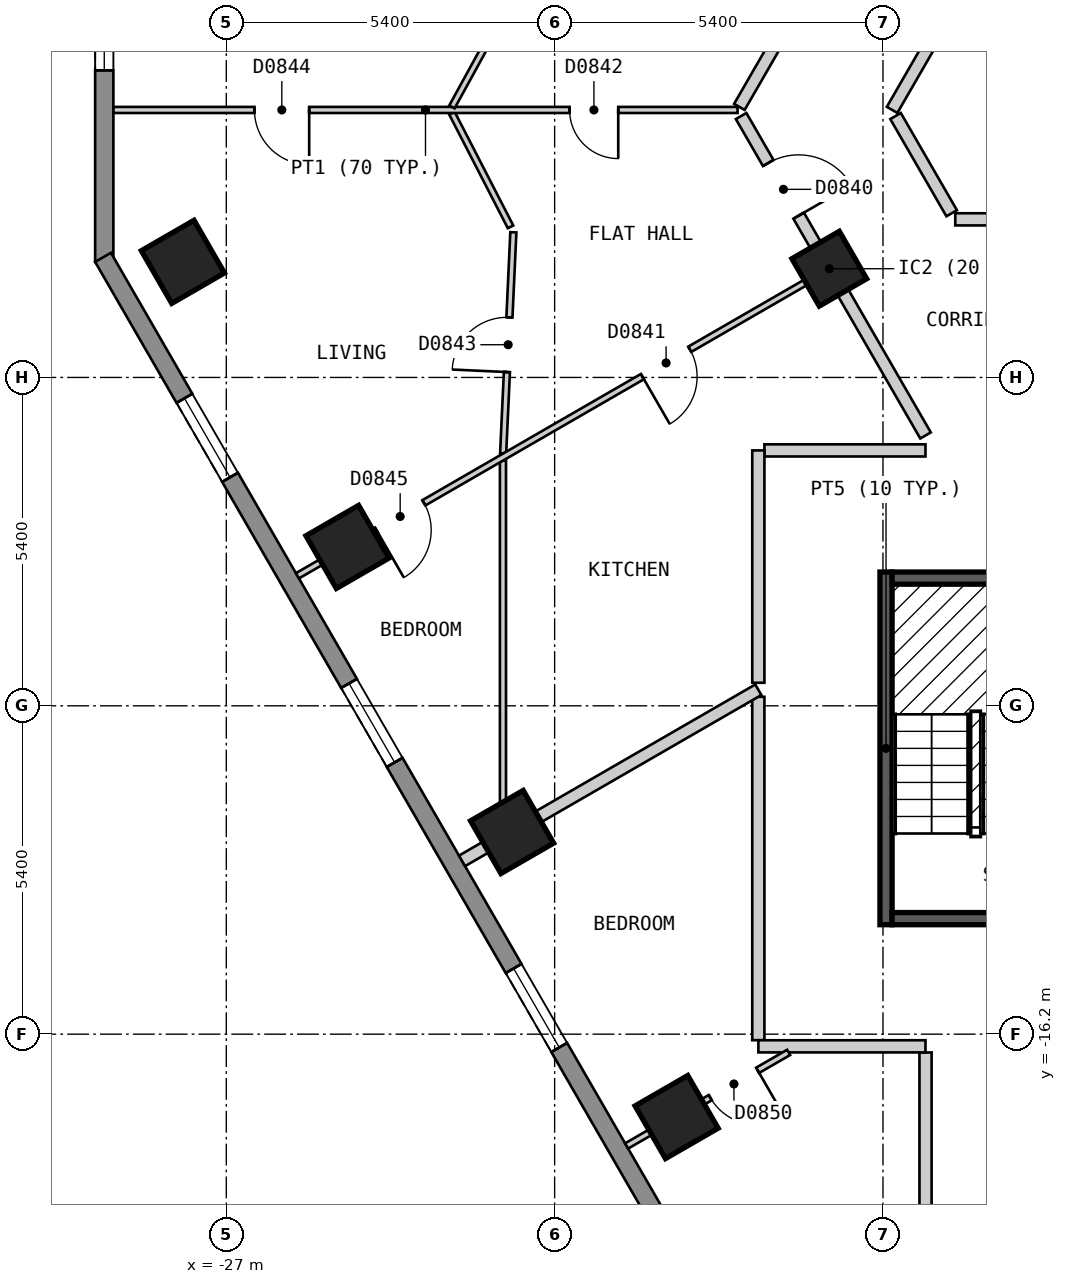
"""IFC4 building model, lengths in metres.
Left out: names, types, materials, properties, quantities, classifications, styles, units other than length and angle.
Written with IfcOpenShell. Run it as: python <this file> out.ifc"""

import sys

from ifc_helpers import new_model, si_unit, direction, frame, frame_2d, origin, origin_2d, place, context, subcontext, project, spatial, polyline, rectangle, outline, extrude, element, fill, save


model = new_model("IFC4")
c1 = context("Model", 3, precision=1e-05, world=origin(), true_north=direction((0.0, 1.0)))
c2 = subcontext(c1, "Body", "Model", "MODEL_VIEW")
j1 = project(units=[si_unit("LENGTHUNIT", "METRE"), si_unit("PLANEANGLEUNIT", "RADIAN")], contexts=[c1])
p1 = place(None, origin())
s1 = spatial("IfcSite", under=j1, at=p1, CompositionType="ELEMENT")
p2 = place(p1, origin())
s2 = spatial("IfcBuilding", under=s1, at=p2, CompositionType="ELEMENT")
p3 = place(p2, frame((0.0, 0.0, 72.0)))
s3 = spatial("IfcBuildingStorey", under=s2, at=p3, CompositionType="ELEMENT", Elevation=72.0)
for number, where, z_axis, x_axis in (
    (1, (-27.714, -3.499, 0.0), (0.0, 0.0, 1.0), (0.5, -0.866, 0.0)),
    (2, (-25.007, -8.187, 0.0), (0.0, 0.0, 1.0), (0.5, -0.866, 0.0)),
    (3, (-22.3, -12.875, 0.0), (0.0, 0.0, 1.0), (0.5, -0.866, 0.0)),
    (4, (-19.594, -17.563, 0.0), (0.0, 0.0, 1.0), (0.5, -0.866, 0.0)),
):
    element("IfcColumn", number, at=place(p3, frame(where, z_axis=z_axis, x_axis=x_axis)), inside=s3, PredefinedType="COLUMN", context=c2, shape_type="SweptSolid", body=[
        extrude(rectangle(XDim=1.0, YDim=1.0, at=origin_2d()), origin(), (0.0, 0.0, 1.0), 3.0),
    ])
p4 = place(p3, frame((-17.083, -3.612, 0.0), z_axis=(0.0, 0.0, 1.0), x_axis=(0.5, -0.866025403784, 0.0)))
e5 = element("IfcColumn", 5, at=p4, inside=s3, PredefinedType="COLUMN", context=c2, shape_type="SweptSolid", body=[
    extrude(rectangle(XDim=0.9, YDim=0.9, at=origin_2d()), origin(), (0.0, 0.0, 1.0), 3.0),
])
p5 = place(p3, frame((-29.007, 1.5, 0.0), z_axis=(0.0, 0.0, 1.0), x_axis=(0.0, -1.0, 0.0)))
e6 = element("IfcWall", 6, at=p5, inside=s3, PredefinedType="SOLIDWALL", context=c2, shape_type="SweptSolid", body=[
    extrude(outline(polyline([(0.0, -0.15), (5.0, -0.15), (4.92, 0.15), (0.08, 0.15), (0.0, -0.15)])), origin(), (0.0, 0.0, 1.0), 2.7),
])
p6 = place(p5, frame((0.65, 0.0, 0.15)))
e7 = element("IfcOpeningElement", 7, at=p6, cuts=e6, PredefinedType="OPENING", context=c2, shape_type="SweptSolid", body=[
    extrude(rectangle(XDim=1.2, YDim=2.1, at=frame_2d((0.6, 1.05))), frame((0.0, 0.16, 0.0), z_axis=(0.0, -1.0, 0.0), x_axis=(1.0, 0.0, 0.0)), (0.0, 0.0, 1.0), 0.32),
])
p7 = place(p3, frame((-29.027, -3.425, 0.0), z_axis=(0.0, 0.0, 1.0), x_axis=(0.500035407905, -0.866004960056, 0.0)))
e8 = element("IfcWall", 8, at=p7, inside=s3, PredefinedType="SOLIDWALL", context=c2, shape_type="SweptSolid", body=[
    extrude(outline(polyline([(0.0, -0.15), (23.094, -0.15), (23.014, 0.15), (0.08, 0.15), (0.0, -0.15)])), origin(), (0.0, 0.0, 1.0), 2.7),
])
p8 = place(p7, frame((2.677, 0.0, 0.15)))
e9 = element("IfcOpeningElement", 9, at=p8, cuts=e8, PredefinedType="OPENING", context=c2, shape_type="SweptSolid", body=[
    extrude(rectangle(XDim=1.5, YDim=2.1, at=frame_2d((0.75, 1.05))), frame((0.0, 0.16, 0.0), z_axis=(0.0, -1.0, 0.0), x_axis=(1.0, 0.0, 0.0)), (0.0, 0.0, 1.0), 0.32),
])
p9 = place(p7, frame((8.091, 0.0, 0.15)))
e10 = element("IfcOpeningElement", 10, at=p9, cuts=e8, PredefinedType="OPENING", context=c2, shape_type="SweptSolid", body=[
    extrude(rectangle(XDim=1.5, YDim=2.1, at=frame_2d((0.75, 1.05))), frame((0.0, 0.16, 0.0), z_axis=(0.0, -1.0, 0.0), x_axis=(1.0, 0.0, 0.0)), (0.0, 0.0, 1.0), 0.32),
])
p10 = place(p7, frame((13.504, 0.0, 0.15)))
e11 = element("IfcOpeningElement", 11, at=p10, cuts=e8, PredefinedType="OPENING", context=c2, shape_type="SweptSolid", body=[
    extrude(rectangle(XDim=1.5, YDim=2.1, at=frame_2d((0.75, 1.05))), frame((0.0, 0.16, 0.0), z_axis=(0.0, -1.0, 0.0), x_axis=(1.0, 0.0, 0.0)), (0.0, 0.0, 1.0), 0.32),
])
p11 = place(p7, frame((18.917, 0.0, 0.15)))
e12 = element("IfcOpeningElement", 12, at=p11, cuts=e8, PredefinedType="OPENING", context=c2, shape_type="SweptSolid", body=[
    extrude(rectangle(XDim=1.5, YDim=2.1, at=frame_2d((0.75, 1.05))), frame((0.0, 0.16, 0.0), z_axis=(0.0, -1.0, 0.0), x_axis=(1.0, 0.0, 0.0)), (0.0, 0.0, 1.0), 0.32),
])
p12 = place(p3, frame((-15.993, -1.101, 0.0), z_axis=(0.0, 0.0, 1.0), x_axis=(0.499894174133, -0.866086493757, 0.0)))
e13 = element("IfcWall", 13, at=p12, inside=s3, PredefinedType="PARTITIONING", context=c2, shape_type="SweptSolid", body=[
    extrude(rectangle(XDim=1.846, YDim=0.2, at=frame_2d((0.923, 0.0))), origin(), (0.0, 0.0, 1.0), 2.7),
])
p13 = place(p3, frame((-18.533, -1.101, 0.0), z_axis=(0.0, 0.0, 1.0), x_axis=(0.500022085096, -0.866012652573, 0.0)))
e14 = element("IfcWall", 14, at=p13, inside=s3, PredefinedType="PARTITIONING", context=c2, shape_type="SweptSolid", body=[
    extrude(rectangle(XDim=6.066, YDim=0.2, at=frame_2d((3.033, 0.0))), origin(), (0.0, 0.0, 1.0), 2.7),
])
p14 = place(p13, frame((0.892, 0.0, 0.0)))
e15 = element("IfcOpeningElement", 15, at=p14, cuts=e14, PredefinedType="OPENING", context=c2, shape_type="SweptSolid", body=[
    extrude(rectangle(XDim=1.0, YDim=2.1, at=frame_2d((0.5, 1.05))), frame((0.0, 0.11, 0.0), z_axis=(0.0, -1.0, 0.0), x_axis=(1.0, 0.0, 0.0)), (0.0, 0.0, 1.0), 0.22),
])
p15 = place(p3, frame((-15.5, -16.501, 0.0), z_axis=(0.0, 0.0, 1.0), x_axis=(0.0, -1.0, 0.0)))
e16 = element("IfcWall", 16, at=p15, inside=s3, PredefinedType="PARTITIONING", context=c2, shape_type="SweptSolid", body=[
    extrude(rectangle(XDim=4.598, YDim=0.2, at=frame_2d((2.299, 0.0))), origin(), (0.0, 0.0, 1.0), 2.7),
])
p16 = place(p3, frame((-18.25, -10.652, 0.0), z_axis=(0.0, 0.0, 1.0), x_axis=(0.0, -1.0, 0.0)))
e17 = element("IfcWall", 17, at=p16, inside=s3, PredefinedType="PARTITIONING", context=c2, shape_type="SweptSolid", body=[
    extrude(rectangle(XDim=5.647, YDim=0.2, at=frame_2d((2.823, 0.0))), origin(), (0.0, 0.0, 1.0), 2.7),
])
p17 = place(p3, frame((-18.15, -6.6, 0.0), z_axis=(0.0, 0.0, 1.0), x_axis=(1.0, 0.0, 0.0)))
e18 = element("IfcWall", 18, at=p17, inside=s3, PredefinedType="PARTITIONING", context=c2, shape_type="SweptSolid", body=[
    extrude(rectangle(XDim=2.649, YDim=0.2, at=frame_2d((1.324, 0.0))), origin(), (0.0, 0.0, 1.0), 2.7),
])
p18 = place(p3, frame((-18.249, -16.4, 0.0), z_axis=(0.0, 0.0, 1.0), x_axis=(1.0, 0.0, 0.0)))
e19 = element("IfcWall", 19, at=p18, inside=s3, PredefinedType="PARTITIONING", context=c2, shape_type="SweptSolid", body=[
    extrude(rectangle(XDim=2.748, YDim=0.2, at=frame_2d((1.374, 0.0))), origin(), (0.0, 0.0, 1.0), 2.7),
])
p19 = place(p3, frame((-15.011, -2.8, 0.0), z_axis=(0.0, 0.0, 1.0), x_axis=(1.0, 0.0, 0.0)))
e20 = element("IfcWall", 20, at=p19, inside=s3, PredefinedType="PARTITIONING", context=c2, shape_type="SweptSolid", body=[
    extrude(rectangle(XDim=7.982, YDim=0.2, at=frame_2d((3.991, 0.0))), origin(), (0.0, 0.0, 1.0), 2.7),
])
p20 = place(p3, frame((-16.05, -1.0, 0.0), z_axis=(0.0, 0.0, 1.0), x_axis=(0.499962449088, 0.866047082728, 0.0)))
e21 = element("IfcWall", 21, at=p20, inside=s3, PredefinedType="PARTITIONING", context=c2, shape_type="SweptSolid", body=[
    extrude(rectangle(XDim=10.391, YDim=0.2, at=frame_2d((5.195, 0.0))), origin(), (0.0, 0.0, 1.0), 2.7),
])
p21 = place(p20, frame((4.745, 0.0, 0.0)))
e22 = element("IfcOpeningElement", 22, at=p21, cuts=e21, PredefinedType="OPENING", context=c2, shape_type="SweptSolid", body=[
    extrude(rectangle(XDim=0.9, YDim=2.1, at=frame_2d((0.45, 1.05))), frame((0.0, 0.11, 0.0), z_axis=(0.0, -1.0, 0.0), x_axis=(1.0, 0.0, 0.0)), (0.0, 0.0, 1.0), 0.22),
])
p22 = place(p3, frame((-18.562, -0.951, 0.0), z_axis=(0.0, 0.0, 1.0), x_axis=(0.499992962407, 0.866029466902, 0.0)))
e23 = element("IfcWall", 23, at=p22, inside=s3, PredefinedType="PARTITIONING", context=c2, shape_type="SweptSolid", body=[
    extrude(rectangle(XDim=20.208, YDim=0.2, at=frame_2d((10.104, 0.0))), origin(), (0.0, 0.0, 1.0), 2.7),
])
p23 = place(p22, frame((14.627, 0.0, 0.0)))
e24 = element("IfcOpeningElement", 24, at=p23, cuts=e23, PredefinedType="OPENING", context=c2, shape_type="SweptSolid", body=[
    extrude(rectangle(XDim=1.0, YDim=2.1, at=frame_2d((0.5, 1.05))), frame((0.0, 0.11, 0.0), z_axis=(0.0, -1.0, 0.0), x_axis=(1.0, 0.0, 0.0)), (0.0, 0.0, 1.0), 0.22),
])
p24 = place(p22, frame((4.581, 0.0, 0.0)))
e25 = element("IfcOpeningElement", 25, at=p24, cuts=e23, PredefinedType="OPENING", context=c2, shape_type="SweptSolid", body=[
    extrude(rectangle(XDim=1.0, YDim=2.1, at=frame_2d((0.5, 1.05))), frame((0.0, 0.11, 0.0), z_axis=(0.0, -1.0, 0.0), x_axis=(1.0, 0.0, 0.0)), (0.0, 0.0, 1.0), 0.22),
])
p25 = place(p3, frame((-18.25, -10.421, 0.0), z_axis=(0.0, 0.0, 1.0), x_axis=(0.0, 1.0, 0.0)))
e26 = element("IfcWall", 26, at=p25, inside=s3, PredefinedType="PARTITIONING", context=c2, shape_type="SweptSolid", body=[
    extrude(rectangle(XDim=3.821, YDim=0.2, at=frame_2d((1.91, 0.0))), origin(), (0.0, 0.0, 1.0), 2.7),
])
p26 = place(p3, frame((-23.289, -1.054, 0.0), z_axis=(0.0, 0.0, 1.0), x_axis=(0.458226112305, -0.888835659726, 0.0)))
e27 = element("IfcWall", 27, at=p26, inside=s3, PredefinedType="PARTITIONING", context=c2, shape_type="SweptSolid", body=[
    extrude(rectangle(XDim=2.104, YDim=0.1, at=frame_2d((1.052, 0.0))), origin(), (0.0, 0.0, 1.0), 2.7),
])
p27 = place(p3, frame((-28.857, -1.001, 0.0), z_axis=(0.0, 0.0, 1.0), x_axis=(1.0, 0.0, 0.0)))
e28 = element("IfcWall", 28, at=p27, inside=s3, PredefinedType="PARTITIONING", context=c2, shape_type="SweptSolid", body=[
    extrude(rectangle(XDim=10.266, YDim=0.1, at=frame_2d((5.133, 0.0))), origin(), (0.0, 0.0, 1.0), 2.7),
])
p28 = place(p27, frame((7.503, 0.0, 0.0)))
e29 = element("IfcOpeningElement", 29, at=p28, cuts=e28, PredefinedType="OPENING", context=c2, shape_type="SweptSolid", body=[
    extrude(rectangle(XDim=0.8, YDim=2.1, at=frame_2d((0.4, 1.05))), frame((0.0, 0.06, 0.0), z_axis=(0.0, -1.0, 0.0), x_axis=(1.0, 0.0, 0.0)), (0.0, 0.0, 1.0), 0.12),
])
p29 = place(p27, frame((2.32, 0.0, 0.0)))
e30 = element("IfcOpeningElement", 30, at=p29, cuts=e28, PredefinedType="OPENING", context=c2, shape_type="SweptSolid", body=[
    extrude(rectangle(XDim=0.9, YDim=2.1, at=frame_2d((0.45, 1.05))), frame((0.0, 0.06, 0.0), z_axis=(0.0, -1.0, 0.0), x_axis=(1.0, 0.0, 0.0)), (0.0, 0.0, 1.0), 0.12),
])
p30 = place(p3, frame((-23.289, -0.951, 0.0), z_axis=(0.0, 0.0, 1.0), x_axis=(0.481164463081, 0.876630343684, 0.0)))
e31 = element("IfcWall", 31, at=p30, inside=s3, PredefinedType="PARTITIONING", context=c2, shape_type="SweptSolid", body=[
    extrude(rectangle(XDim=4.834, YDim=0.1, at=frame_2d((2.417, 0.0))), origin(), (0.0, 0.0, 1.0), 2.7),
])
p31 = place(p3, frame((-22.447, -6.651, 0.0), z_axis=(0.0, 0.0, 1.0), x_axis=(0.046122262393, 0.998935802197, 0.0)))
e32 = element("IfcWall", 32, at=p31, inside=s3, PredefinedType="PARTITIONING", context=c2, shape_type="SweptSolid", body=[
    extrude(rectangle(XDim=3.642, YDim=0.1, at=frame_2d((1.821, 0.0))), origin(), (0.0, 0.0, 1.0), 2.7),
])
p32 = place(p31, frame((1.341, 0.0, 0.0)))
e33 = element("IfcOpeningElement", 33, at=p32, cuts=e32, PredefinedType="OPENING", context=c2, shape_type="SweptSolid", body=[
    extrude(rectangle(XDim=0.9, YDim=2.1, at=frame_2d((0.45, 1.05))), frame((0.0, 0.06, 0.0), z_axis=(0.0, -1.0, 0.0), x_axis=(1.0, 0.0, 0.0)), (0.0, 0.0, 1.0), 0.12),
])
p33 = place(p3, frame((-22.45, -12.846, 0.0), z_axis=(0.0, 0.0, 1.0), x_axis=(0.0, 1.0, 0.0)))
e34 = element("IfcWall", 34, at=p33, inside=s3, PredefinedType="PARTITIONING", context=c2, shape_type="SweptSolid", body=[
    extrude(rectangle(XDim=6.078, YDim=0.1, at=frame_2d((3.039, 0.0))), origin(), (0.0, 0.0, 1.0), 2.7),
])
p34 = place(p3, frame((-20.416, -18.038, 0.0), z_axis=(0.0, 0.0, 1.0), x_axis=(0.866026989333, 0.499997253739, 0.0)))
e35 = element("IfcWall", 35, at=p34, inside=s3, PredefinedType="PARTITIONING", context=c2, shape_type="SweptSolid", body=[
    extrude(rectangle(XDim=3.076, YDim=0.1, at=frame_2d((1.538, 0.0))), origin(), (0.0, 0.0, 1.0), 2.7),
])
p35 = place(p34, frame((1.588, 0.0, 0.0)))
e36 = element("IfcOpeningElement", 36, at=p35, cuts=e35, PredefinedType="OPENING", context=c2, shape_type="SweptSolid", body=[
    extrude(rectangle(XDim=0.9, YDim=2.1, at=frame_2d((0.45, 1.05))), frame((0.0, 0.06, 0.0), z_axis=(0.0, -1.0, 0.0), x_axis=(1.0, 0.0, 0.0)), (0.0, 0.0, 1.0), 0.12),
])
p36 = place(p3, frame((-25.83, -8.662, 0.0), z_axis=(0.0, 0.0, 1.0), x_axis=(0.866022959057, 0.500004234368, 0.0)))
e37 = element("IfcWall", 37, at=p36, inside=s3, PredefinedType="PARTITIONING", context=c2, shape_type="SweptSolid", body=[
    extrude(rectangle(XDim=10.0, YDim=0.1, at=frame_2d((5.0, 0.0))), origin(), (0.0, 0.0, 1.0), 2.7),
])
p37 = place(p36, frame((6.551, 0.0, 0.0)))
e38 = element("IfcOpeningElement", 38, at=p37, cuts=e37, PredefinedType="OPENING", context=c2, shape_type="SweptSolid", body=[
    extrude(rectangle(XDim=0.9, YDim=2.1, at=frame_2d((0.45, 1.05))), frame((0.0, 0.06, 0.0), z_axis=(0.0, -1.0, 0.0), x_axis=(1.0, 0.0, 0.0)), (0.0, 0.0, 1.0), 0.12),
])
p38 = place(p36, frame((1.501, 0.0, 0.0)))
e39 = element("IfcOpeningElement", 39, at=p38, cuts=e37, PredefinedType="OPENING", context=c2, shape_type="SweptSolid", body=[
    extrude(rectangle(XDim=0.9, YDim=2.1, at=frame_2d((0.45, 1.05))), frame((0.0, 0.06, 0.0), z_axis=(0.0, -1.0, 0.0), x_axis=(1.0, 0.0, 0.0)), (0.0, 0.0, 1.0), 0.12),
])
p39 = place(p3, frame((-23.123, -13.35, 0.0), z_axis=(0.0, 0.0, 1.0), x_axis=(0.86596737403, 0.500100497016, 0.0)))
e40 = element("IfcWall", 40, at=p39, inside=s3, PredefinedType="PARTITIONING", context=c2, shape_type="SweptSolid", body=[
    extrude(rectangle(XDim=5.627, YDim=0.2, at=frame_2d((2.813, 0.0))), origin(), (0.0, 0.0, 1.0), 2.7),
])
p40 = place(p3, frame((-16.15, -14.4, 0.0), z_axis=(0.0, 0.0, 1.0), x_axis=(0.0, 1.0, 0.0)))
e41 = element("IfcWall", 41, at=p40, inside=s3, PredefinedType="SOLIDWALL", context=c2, shape_type="SweptSolid", body=[
    extrude(rectangle(XDim=5.8, YDim=0.2, at=frame_2d((2.9, 0.0))), origin(), (0.0, 0.0, 1.0), 2.7),
])
for number, where, z_axis, x_axis in (
    (42, (-16.05, -14.3, 0.0), (0.0, 0.0, 1.0), (1.0, 0.0, 0.0)),
    (43, (-16.05, -8.7, 0.0), (0.0, 0.0, 1.0), (1.0, 0.0, 0.0)),
):
    element("IfcWall", number, at=place(p3, frame(where, z_axis=z_axis, x_axis=x_axis)), inside=s3, PredefinedType="SOLIDWALL", context=c2, shape_type="SweptSolid", body=[
        extrude(rectangle(XDim=2.75, YDim=0.2, at=frame_2d((1.375, 0.0))), origin(), (0.0, 0.0, 1.0), 2.7),
    ])
p41 = place(p6, origin())
e44 = element("IfcWindow", 44, at=p41, inside=s3, PartitioningType="SINGLE_PANEL", PredefinedType="WINDOW", context=c2, shape_type="SweptSolid", body=[
    extrude(rectangle(XDim=1.2, YDim=2.1, at=frame_2d((0.6, 1.05))), frame((0.0, 0.03, 0.0), z_axis=(0.0, -1.0, 0.0), x_axis=(1.0, 0.0, 0.0)), (0.0, 0.0, 1.0), 0.06),
])
fill(e7, e44)
p42 = place(p8, origin())
e45 = element("IfcWindow", 45, at=p42, inside=s3, PartitioningType="SINGLE_PANEL", PredefinedType="WINDOW", context=c2, shape_type="SweptSolid", body=[
    extrude(rectangle(XDim=1.5, YDim=2.1, at=frame_2d((0.75, 1.05))), frame((0.0, 0.03, 0.0), z_axis=(0.0, -1.0, 0.0), x_axis=(1.0, 0.0, 0.0)), (0.0, 0.0, 1.0), 0.06),
])
fill(e9, e45)
p43 = place(p9, origin())
e46 = element("IfcWindow", 46, at=p43, inside=s3, PartitioningType="SINGLE_PANEL", PredefinedType="WINDOW", context=c2, shape_type="SweptSolid", body=[
    extrude(rectangle(XDim=1.5, YDim=2.1, at=frame_2d((0.75, 1.05))), frame((0.0, 0.03, 0.0), z_axis=(0.0, -1.0, 0.0), x_axis=(1.0, 0.0, 0.0)), (0.0, 0.0, 1.0), 0.06),
])
fill(e10, e46)
p44 = place(p10, origin())
e47 = element("IfcWindow", 47, at=p44, inside=s3, PartitioningType="SINGLE_PANEL", PredefinedType="WINDOW", context=c2, shape_type="SweptSolid", body=[
    extrude(rectangle(XDim=1.5, YDim=2.1, at=frame_2d((0.75, 1.05))), frame((0.0, 0.03, 0.0), z_axis=(0.0, -1.0, 0.0), x_axis=(1.0, 0.0, 0.0)), (0.0, 0.0, 1.0), 0.06),
])
fill(e11, e47)
p45 = place(p14, origin())
e48 = element("IfcDoor", 48, at=p45, inside=s3, OperationType="SINGLE_SWING_RIGHT", PredefinedType="DOOR", context=c2, shape_type="SweptSolid", body=[
    extrude(rectangle(XDim=1.0, YDim=2.1, at=frame_2d((0.5, 1.05))), frame((0.0, 0.025, 0.0), z_axis=(0.0, -1.0, 0.0), x_axis=(1.0, 0.0, 0.0)), (0.0, 0.0, 1.0), 0.05),
])
fill(e15, e48)
p46 = place(p37, origin())
e49 = element("IfcDoor", 49, at=p46, inside=s3, OperationType="SINGLE_SWING_LEFT", PredefinedType="DOOR", context=c2, shape_type="SweptSolid", body=[
    extrude(rectangle(XDim=0.9, YDim=2.1, at=frame_2d((0.45, 1.05))), frame((0.0, 0.025, 0.0), z_axis=(0.0, -1.0, 0.0), x_axis=(1.0, 0.0, 0.0)), (0.0, 0.0, 1.0), 0.05),
])
fill(e38, e49)
p47 = place(p28, origin())
e50 = element("IfcDoor", 50, at=p47, inside=s3, OperationType="SINGLE_SWING_RIGHT", PredefinedType="DOOR", context=c2, shape_type="SweptSolid", body=[
    extrude(rectangle(XDim=0.8, YDim=2.1, at=frame_2d((0.4, 1.05))), frame((0.0, 0.025, 0.0), z_axis=(0.0, -1.0, 0.0), x_axis=(1.0, 0.0, 0.0)), (0.0, 0.0, 1.0), 0.05),
])
fill(e29, e50)
p48 = place(p32, origin())
e51 = element("IfcDoor", 51, at=p48, inside=s3, OperationType="SINGLE_SWING_LEFT", PredefinedType="DOOR", context=c2, shape_type="SweptSolid", body=[
    extrude(rectangle(XDim=0.9, YDim=2.1, at=frame_2d((0.45, 1.05))), frame((0.0, 0.025, 0.0), z_axis=(0.0, -1.0, 0.0), x_axis=(1.0, 0.0, 0.0)), (0.0, 0.0, 1.0), 0.05),
])
fill(e33, e51)
p49 = place(p29, origin())
e52 = element("IfcDoor", 52, at=p49, inside=s3, OperationType="SINGLE_SWING_RIGHT", PredefinedType="DOOR", context=c2, shape_type="SweptSolid", body=[
    extrude(rectangle(XDim=0.9, YDim=2.1, at=frame_2d((0.45, 1.05))), frame((0.0, 0.025, 0.0), z_axis=(0.0, -1.0, 0.0), x_axis=(1.0, 0.0, 0.0)), (0.0, 0.0, 1.0), 0.05),
])
fill(e30, e52)
p50 = place(p38, origin())
e53 = element("IfcDoor", 53, at=p50, inside=s3, OperationType="SINGLE_SWING_LEFT", PredefinedType="DOOR", context=c2, shape_type="SweptSolid", body=[
    extrude(rectangle(XDim=0.9, YDim=2.1, at=frame_2d((0.45, 1.05))), frame((0.0, 0.025, 0.0), z_axis=(0.0, -1.0, 0.0), x_axis=(1.0, 0.0, 0.0)), (0.0, 0.0, 1.0), 0.05),
])
fill(e39, e53)
p51 = place(p35, origin())
e54 = element("IfcDoor", 54, at=p51, inside=s3, OperationType="SINGLE_SWING_RIGHT", PredefinedType="DOOR", context=c2, shape_type="SweptSolid", body=[
    extrude(rectangle(XDim=0.9, YDim=2.1, at=frame_2d((0.45, 1.05))), frame((0.0, 0.025, 0.0), z_axis=(0.0, -1.0, 0.0), x_axis=(1.0, 0.0, 0.0)), (0.0, 0.0, 1.0), 0.05),
])
fill(e36, e54)
save(model, sys.argv[1])
